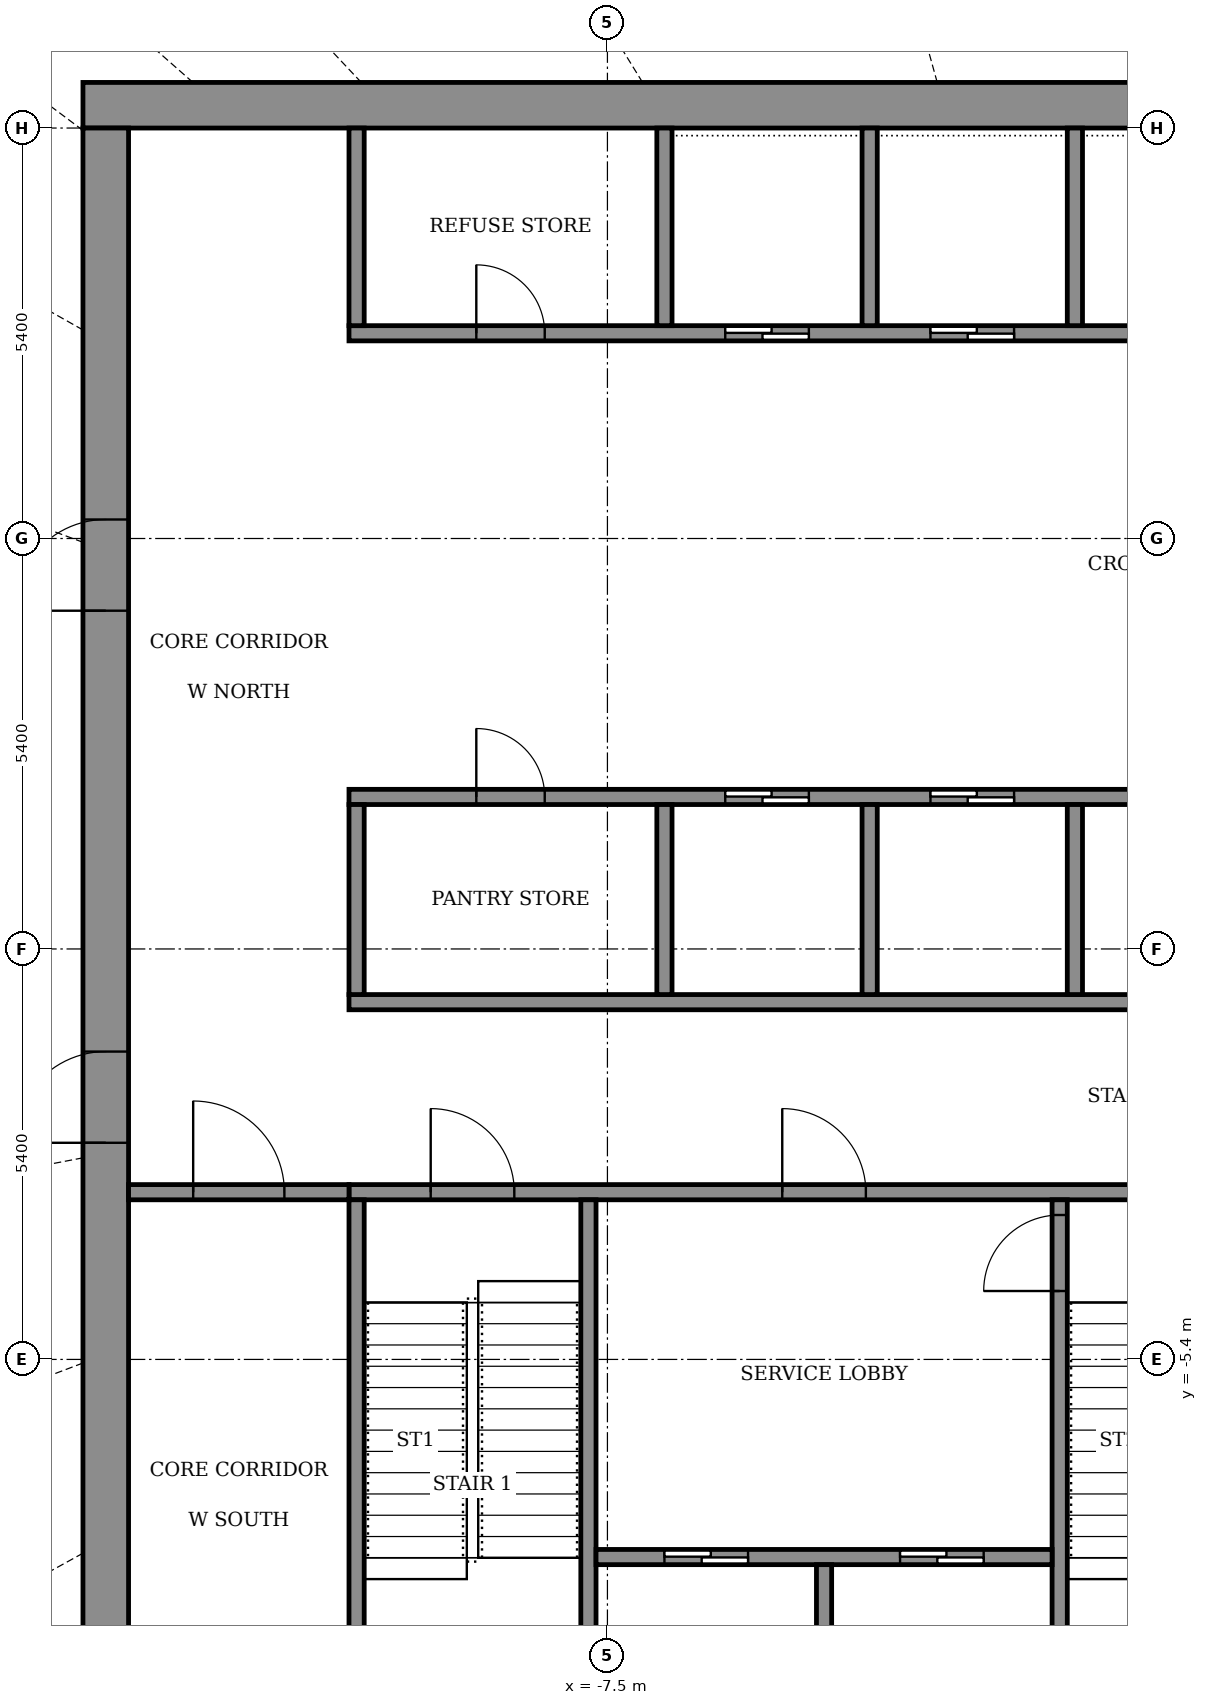
"""IFC4 building model, lengths in metres.
Left out: names, types, materials, properties, quantities, classifications, styles, units other than length and angle.
Written with IfcOpenShell. Run it as: python <this file> out.ifc"""

import sys

from ifc_helpers import new_model, si_unit, direction, frame, frame_2d, origin, place, context, subcontext, project, spatial, rectangle, extrude, element, fill, save


model = new_model("IFC4")
c1 = context("Model", 3, precision=1e-05, world=origin(), true_north=direction((0.0, 1.0)))
c2 = subcontext(c1, "Body", "Model", "MODEL_VIEW")
j1 = project(units=[si_unit("LENGTHUNIT", "METRE"), si_unit("PLANEANGLEUNIT", "RADIAN")], contexts=[c1])
p1 = place(None, origin())
s1 = spatial("IfcSite", under=j1, at=p1, CompositionType="ELEMENT")
p2 = place(p1, origin())
s2 = spatial("IfcBuilding", under=s1, at=p2, CompositionType="ELEMENT")
p3 = place(p2, frame((0.0, 0.0, 337.9)))
s3 = spatial("IfcBuildingStorey", under=s2, at=p3, CompositionType="ELEMENT", Elevation=337.9)
p4 = place(p3, frame((-14.4, 11.1, 0.0), z_axis=(0.0, 0.0, 1.0), x_axis=(1.0, 0.0, 0.0)))
e1 = element("IfcWall", 1, at=p4, inside=s3, PredefinedType="SHEAR", context=c2, shape_type="SweptSolid", body=[
    extrude(rectangle(XDim=28.8, YDim=0.6, at=frame_2d((14.4, 0.0))), origin(), (0.0, 0.0, 1.0), 4.6),
])
p5 = place(p3, frame((-14.1, -10.8, 0.0), z_axis=(0.0, 0.0, 1.0), x_axis=(0.0, 1.0, 0.0)))
e2 = element("IfcWall", 2, at=p5, inside=s3, PredefinedType="SHEAR", context=c2, shape_type="SweptSolid", body=[
    extrude(rectangle(XDim=21.6, YDim=0.6, at=frame_2d((10.8, 0.0))), origin(), (0.0, 0.0, 1.0), 4.6),
])
p6 = place(p5, frame((8.25, 0.0, 0.0)))
e3 = element("IfcOpeningElement", 3, at=p6, cuts=e2, PredefinedType="OPENING", context=c2, shape_type="SweptSolid", body=[
    extrude(rectangle(XDim=1.2, YDim=2.1, at=frame_2d((0.6, 1.05))), frame((0.0, 0.31, 0.0), z_axis=(0.0, -1.0, 0.0), x_axis=(1.0, 0.0, 0.0)), (0.0, 0.0, 1.0), 0.62),
])
p7 = place(p5, frame((15.25, 0.0, 0.0)))
e4 = element("IfcOpeningElement", 4, at=p7, cuts=e2, PredefinedType="OPENING", context=c2, shape_type="SweptSolid", body=[
    extrude(rectangle(XDim=1.2, YDim=2.1, at=frame_2d((0.6, 1.05))), frame((0.0, 0.31, 0.0), z_axis=(0.0, -1.0, 0.0), x_axis=(1.0, 0.0, 0.0)), (0.0, 0.0, 1.0), 0.62),
])
p8 = place(p3, frame((-10.9, -3.2, 0.0), z_axis=(0.0, 0.0, 1.0), x_axis=(1.0, 0.0, 0.0)))
e5 = element("IfcWall", 5, at=p8, inside=s3, PredefinedType="SHEAR", context=c2, shape_type="SweptSolid", body=[
    extrude(rectangle(XDim=21.8, YDim=0.2, at=frame_2d((10.9, 0.0))), origin(), (0.0, 0.0, 1.0), 4.05),
])
p9 = place(p8, frame((1.075, 0.0, 0.0)))
e6 = element("IfcOpeningElement", 6, at=p9, cuts=e5, PredefinedType="OPENING", context=c2, shape_type="SweptSolid", body=[
    extrude(rectangle(XDim=1.1, YDim=2.1, at=frame_2d((0.55, 1.05))), frame((0.0, 0.11, 0.0), z_axis=(0.0, -1.0, 0.0), x_axis=(1.0, 0.0, 0.0)), (0.0, 0.0, 1.0), 0.22),
])
p10 = place(p8, frame((10.325, 0.0, 0.0)))
e7 = element("IfcOpeningElement", 7, at=p10, cuts=e5, PredefinedType="OPENING", context=c2, shape_type="SweptSolid", body=[
    extrude(rectangle(XDim=1.1, YDim=2.1, at=frame_2d((0.55, 1.05))), frame((0.0, 0.11, 0.0), z_axis=(0.0, -1.0, 0.0), x_axis=(1.0, 0.0, 0.0)), (0.0, 0.0, 1.0), 0.22),
])
p11 = place(p8, frame((19.625, 0.0, 0.0)))
e8 = element("IfcOpeningElement", 8, at=p11, cuts=e5, PredefinedType="OPENING", context=c2, shape_type="SweptSolid", body=[
    extrude(rectangle(XDim=1.1, YDim=2.1, at=frame_2d((0.55, 1.05))), frame((0.0, 0.11, 0.0), z_axis=(0.0, -1.0, 0.0), x_axis=(1.0, 0.0, 0.0)), (0.0, 0.0, 1.0), 0.22),
])
p12 = place(p8, frame((5.7, 0.0, 0.0)))
e9 = element("IfcOpeningElement", 9, at=p12, cuts=e5, PredefinedType="OPENING", context=c2, shape_type="SweptSolid", body=[
    extrude(rectangle(XDim=1.1, YDim=2.1, at=frame_2d((0.55, 1.05))), frame((0.0, 0.11, 0.0), z_axis=(0.0, -1.0, 0.0), x_axis=(1.0, 0.0, 0.0)), (0.0, 0.0, 1.0), 0.22),
])
p13 = place(p8, frame((14.975, 0.0, 0.0)))
e10 = element("IfcOpeningElement", 10, at=p13, cuts=e5, PredefinedType="OPENING", context=c2, shape_type="SweptSolid", body=[
    extrude(rectangle(XDim=1.1, YDim=2.1, at=frame_2d((0.55, 1.05))), frame((0.0, 0.11, 0.0), z_axis=(0.0, -1.0, 0.0), x_axis=(1.0, 0.0, 0.0)), (0.0, 0.0, 1.0), 0.22),
])
p14 = place(p3, frame((-10.9, -0.7, 0.0), z_axis=(0.0, 0.0, 1.0), x_axis=(1.0, 0.0, 0.0)))
e11 = element("IfcWall", 11, at=p14, inside=s3, PredefinedType="SHEAR", context=c2, shape_type="SweptSolid", body=[
    extrude(rectangle(XDim=21.8, YDim=0.2, at=frame_2d((10.9, 0.0))), origin(), (0.0, 0.0, 1.0), 4.05),
])
p15 = place(p3, frame((-10.9, 2.0, 0.0), z_axis=(0.0, 0.0, 1.0), x_axis=(1.0, 0.0, 0.0)))
e12 = element("IfcWall", 12, at=p15, inside=s3, PredefinedType="SHEAR", context=c2, shape_type="SweptSolid", body=[
    extrude(rectangle(XDim=21.8, YDim=0.2, at=frame_2d((10.9, 0.0))), origin(), (0.0, 0.0, 1.0), 4.05),
])
p16 = place(p15, frame((4.95, 0.0, 0.0)))
e13 = element("IfcOpeningElement", 13, at=p16, cuts=e12, PredefinedType="OPENING", context=c2, shape_type="SweptSolid", body=[
    extrude(rectangle(XDim=1.1, YDim=2.1, at=frame_2d((0.55, 1.05))), frame((0.0, 0.11, 0.0), z_axis=(0.0, -1.0, 0.0), x_axis=(1.0, 0.0, 0.0)), (0.0, 0.0, 1.0), 0.22),
])
p17 = place(p15, frame((7.65, 0.0, 0.0)))
e14 = element("IfcOpeningElement", 14, at=p17, cuts=e12, PredefinedType="OPENING", context=c2, shape_type="SweptSolid", body=[
    extrude(rectangle(XDim=1.1, YDim=2.1, at=frame_2d((0.55, 1.05))), frame((0.0, 0.11, 0.0), z_axis=(0.0, -1.0, 0.0), x_axis=(1.0, 0.0, 0.0)), (0.0, 0.0, 1.0), 0.22),
])
p18 = place(p15, frame((10.35, 0.0, 0.0)))
e15 = element("IfcOpeningElement", 15, at=p18, cuts=e12, PredefinedType="OPENING", context=c2, shape_type="SweptSolid", body=[
    extrude(rectangle(XDim=1.1, YDim=2.1, at=frame_2d((0.55, 1.05))), frame((0.0, 0.11, 0.0), z_axis=(0.0, -1.0, 0.0), x_axis=(1.0, 0.0, 0.0)), (0.0, 0.0, 1.0), 0.22),
])
p19 = place(p15, frame((1.675, 0.0, 0.0)))
e16 = element("IfcOpeningElement", 16, at=p19, cuts=e12, PredefinedType="OPENING", context=c2, shape_type="SweptSolid", body=[
    extrude(rectangle(XDim=0.9, YDim=2.1, at=frame_2d((0.45, 1.05))), frame((0.0, 0.11, 0.0), z_axis=(0.0, -1.0, 0.0), x_axis=(1.0, 0.0, 0.0)), (0.0, 0.0, 1.0), 0.22),
])
p20 = place(p15, frame((16.525, 0.0, 0.0)))
e17 = element("IfcOpeningElement", 17, at=p20, cuts=e12, PredefinedType="OPENING", context=c2, shape_type="SweptSolid", body=[
    extrude(rectangle(XDim=0.9, YDim=2.1, at=frame_2d((0.45, 1.05))), frame((0.0, 0.11, 0.0), z_axis=(0.0, -1.0, 0.0), x_axis=(1.0, 0.0, 0.0)), (0.0, 0.0, 1.0), 0.22),
])
p21 = place(p3, frame((-10.9, 8.1, 0.0), z_axis=(0.0, 0.0, 1.0), x_axis=(1.0, 0.0, 0.0)))
e18 = element("IfcWall", 18, at=p21, inside=s3, PredefinedType="SHEAR", context=c2, shape_type="SweptSolid", body=[
    extrude(rectangle(XDim=21.8, YDim=0.2, at=frame_2d((10.9, 0.0))), origin(), (0.0, 0.0, 1.0), 4.05),
])
p22 = place(p21, frame((4.95, 0.0, 0.0)))
e19 = element("IfcOpeningElement", 19, at=p22, cuts=e18, PredefinedType="OPENING", context=c2, shape_type="SweptSolid", body=[
    extrude(rectangle(XDim=1.1, YDim=2.1, at=frame_2d((0.55, 1.05))), frame((0.0, 0.11, 0.0), z_axis=(0.0, -1.0, 0.0), x_axis=(1.0, 0.0, 0.0)), (0.0, 0.0, 1.0), 0.22),
])
p23 = place(p21, frame((7.65, 0.0, 0.0)))
e20 = element("IfcOpeningElement", 20, at=p23, cuts=e18, PredefinedType="OPENING", context=c2, shape_type="SweptSolid", body=[
    extrude(rectangle(XDim=1.1, YDim=2.1, at=frame_2d((0.55, 1.05))), frame((0.0, 0.11, 0.0), z_axis=(0.0, -1.0, 0.0), x_axis=(1.0, 0.0, 0.0)), (0.0, 0.0, 1.0), 0.22),
])
p24 = place(p21, frame((10.35, 0.0, 0.0)))
e21 = element("IfcOpeningElement", 21, at=p24, cuts=e18, PredefinedType="OPENING", context=c2, shape_type="SweptSolid", body=[
    extrude(rectangle(XDim=1.1, YDim=2.1, at=frame_2d((0.55, 1.05))), frame((0.0, 0.11, 0.0), z_axis=(0.0, -1.0, 0.0), x_axis=(1.0, 0.0, 0.0)), (0.0, 0.0, 1.0), 0.22),
])
p25 = place(p21, frame((1.675, 0.0, 0.0)))
e22 = element("IfcOpeningElement", 22, at=p25, cuts=e18, PredefinedType="OPENING", context=c2, shape_type="SweptSolid", body=[
    extrude(rectangle(XDim=0.9, YDim=2.1, at=frame_2d((0.45, 1.05))), frame((0.0, 0.11, 0.0), z_axis=(0.0, -1.0, 0.0), x_axis=(1.0, 0.0, 0.0)), (0.0, 0.0, 1.0), 0.22),
])
p26 = place(p21, frame((16.525, 0.0, 0.0)))
e23 = element("IfcOpeningElement", 23, at=p26, cuts=e18, PredefinedType="OPENING", context=c2, shape_type="SweptSolid", body=[
    extrude(rectangle(XDim=0.9, YDim=2.1, at=frame_2d((0.45, 1.05))), frame((0.0, 0.11, 0.0), z_axis=(0.0, -1.0, 0.0), x_axis=(1.0, 0.0, 0.0)), (0.0, 0.0, 1.0), 0.22),
])
for number, where, z_axis, x_axis in (
    (24, (-10.8, -10.8, 0.0), (0.0, 0.0, 1.0), (0.0, 1.0, 0.0)),
    (25, (-7.75, -10.8, 0.0), (0.0, 0.0, 1.0), (0.0, 1.0, 0.0)),
):
    element("IfcWall", number, at=place(p3, frame(where, z_axis=z_axis, x_axis=x_axis)), inside=s3, PredefinedType="SHEAR", context=c2, shape_type="SweptSolid", body=[
        extrude(rectangle(XDim=7.5, YDim=0.2, at=frame_2d((3.75, 0.0))), origin(), (0.0, 0.0, 1.0), 4.05),
    ])
p27 = place(p3, frame((-1.55, -10.8, 0.0), z_axis=(0.0, 0.0, 1.0), x_axis=(0.0, 1.0, 0.0)))
e26 = element("IfcWall", 26, at=p27, inside=s3, PredefinedType="SHEAR", context=c2, shape_type="SweptSolid", body=[
    extrude(rectangle(XDim=7.5, YDim=0.2, at=frame_2d((3.75, 0.0))), origin(), (0.0, 0.0, 1.0), 4.05),
])
p28 = place(p27, frame((6.3, 0.0, 0.0)))
e27 = element("IfcOpeningElement", 27, at=p28, cuts=e26, PredefinedType="OPENING", context=c2, shape_type="SweptSolid", body=[
    extrude(rectangle(XDim=1.0, YDim=2.1, at=frame_2d((0.5, 1.05))), frame((0.0, 0.11, 0.0), z_axis=(0.0, -1.0, 0.0), x_axis=(1.0, 0.0, 0.0)), (0.0, 0.0, 1.0), 0.22),
])
p29 = place(p3, frame((-7.65, -8.0, 0.0), z_axis=(0.0, 0.0, 1.0), x_axis=(1.0, 0.0, 0.0)))
e28 = element("IfcWall", 28, at=p29, inside=s3, PredefinedType="SHEAR", context=c2, shape_type="SweptSolid", body=[
    extrude(rectangle(XDim=6.0, YDim=0.2, at=frame_2d((3.0, 0.0))), origin(), (0.0, 0.0, 1.0), 4.05),
])
p30 = place(p29, frame((0.9, 0.0, 0.0)))
e29 = element("IfcOpeningElement", 29, at=p30, cuts=e28, PredefinedType="OPENING", context=c2, shape_type="SweptSolid", body=[
    extrude(rectangle(XDim=1.1, YDim=2.1, at=frame_2d((0.55, 1.05))), frame((0.0, 0.11, 0.0), z_axis=(0.0, -1.0, 0.0), x_axis=(1.0, 0.0, 0.0)), (0.0, 0.0, 1.0), 0.22),
])
p31 = place(p29, frame((4.0, 0.0, 0.0)))
e30 = element("IfcOpeningElement", 30, at=p31, cuts=e28, PredefinedType="OPENING", context=c2, shape_type="SweptSolid", body=[
    extrude(rectangle(XDim=1.1, YDim=2.1, at=frame_2d((0.55, 1.05))), frame((0.0, 0.11, 0.0), z_axis=(0.0, -1.0, 0.0), x_axis=(1.0, 0.0, 0.0)), (0.0, 0.0, 1.0), 0.22),
])
p32 = place(p3, frame((-4.65, -10.8, 0.0), z_axis=(0.0, 0.0, 1.0), x_axis=(0.0, 1.0, 0.0)))
e31 = element("IfcWall", 31, at=p32, inside=s3, PredefinedType="SHEAR", context=c2, shape_type="SweptSolid", body=[
    extrude(rectangle(XDim=2.7, YDim=0.2, at=frame_2d((1.35, 0.0))), origin(), (0.0, 0.0, 1.0), 4.05),
])
p33 = place(p3, frame((-10.8, -0.6, 0.0), z_axis=(0.0, 0.0, 1.0), x_axis=(0.0, 1.0, 0.0)))
e32 = element("IfcWall", 32, at=p33, inside=s3, PredefinedType="STANDARD", context=c2, shape_type="SweptSolid", body=[
    extrude(rectangle(XDim=2.5, YDim=0.2, at=frame_2d((1.25, 0.0))), origin(), (0.0, 0.0, 1.0), 4.05),
])
for number, where, z_axis, x_axis in (
    (33, (-6.75, -0.6, 0.0), (0.0, 0.0, 1.0), (0.0, 1.0, 0.0)),
    (34, (-4.05, -0.6, 0.0), (0.0, 0.0, 1.0), (0.0, 1.0, 0.0)),
    (35, (-1.35, -0.6, 0.0), (0.0, 0.0, 1.0), (0.0, 1.0, 0.0)),
):
    element("IfcWall", number, at=place(p3, frame(where, z_axis=z_axis, x_axis=x_axis)), inside=s3, PredefinedType="SHEAR", context=c2, shape_type="SweptSolid", body=[
        extrude(rectangle(XDim=2.5, YDim=0.2, at=frame_2d((1.25, 0.0))), origin(), (0.0, 0.0, 1.0), 4.05),
    ])
p34 = place(p3, frame((-10.8, 8.2, 0.0), z_axis=(0.0, 0.0, 1.0), x_axis=(0.0, 1.0, 0.0)))
e36 = element("IfcWall", 36, at=p34, inside=s3, PredefinedType="STANDARD", context=c2, shape_type="SweptSolid", body=[
    extrude(rectangle(XDim=2.6, YDim=0.2, at=frame_2d((1.3, 0.0))), origin(), (0.0, 0.0, 1.0), 4.05),
])
for number, where, z_axis, x_axis in (
    (37, (-6.75, 8.2, 0.0), (0.0, 0.0, 1.0), (0.0, 1.0, 0.0)),
    (38, (-4.05, 8.2, 0.0), (0.0, 0.0, 1.0), (0.0, 1.0, 0.0)),
    (39, (-1.35, 8.2, 0.0), (0.0, 0.0, 1.0), (0.0, 1.0, 0.0)),
):
    element("IfcWall", number, at=place(p3, frame(where, z_axis=z_axis, x_axis=x_axis)), inside=s3, PredefinedType="SHEAR", context=c2, shape_type="SweptSolid", body=[
        extrude(rectangle(XDim=2.6, YDim=0.2, at=frame_2d((1.3, 0.0))), origin(), (0.0, 0.0, 1.0), 4.05),
    ])
p35 = place(p3, frame((-13.8, -3.2, 0.0), z_axis=(0.0, 0.0, 1.0), x_axis=(1.0, 0.0, 0.0)))
e40 = element("IfcWall", 40, at=p35, inside=s3, PredefinedType="STANDARD", context=c2, shape_type="SweptSolid", body=[
    extrude(rectangle(XDim=2.9, YDim=0.2, at=frame_2d((1.45, 0.0))), origin(), (0.0, 0.0, 1.0), 4.05),
])
p36 = place(p35, frame((0.85, 0.0, 0.0)))
e41 = element("IfcOpeningElement", 41, at=p36, cuts=e40, PredefinedType="OPENING", context=c2, shape_type="SweptSolid", body=[
    extrude(rectangle(XDim=1.2, YDim=2.1, at=frame_2d((0.6, 1.05))), frame((0.0, 0.11, 0.0), z_axis=(0.0, -1.0, 0.0), x_axis=(1.0, 0.0, 0.0)), (0.0, 0.0, 1.0), 0.22),
])
p37 = place(p6, origin())
e42 = element("IfcDoor", 42, at=p37, inside=s3, OperationType="DOUBLE_DOOR_SINGLE_SWING", PredefinedType="DOOR", context=c2, shape_type="SweptSolid", body=[
    extrude(rectangle(XDim=1.2, YDim=2.1, at=frame_2d((0.6, 1.05))), frame((0.0, 0.025, 0.0), z_axis=(0.0, -1.0, 0.0), x_axis=(1.0, 0.0, 0.0)), (0.0, 0.0, 1.0), 0.05),
])
fill(e3, e42)
p38 = place(p7, origin())
e43 = element("IfcDoor", 43, at=p38, inside=s3, OperationType="DOUBLE_DOOR_SINGLE_SWING", PredefinedType="DOOR", context=c2, shape_type="SweptSolid", body=[
    extrude(rectangle(XDim=1.2, YDim=2.1, at=frame_2d((0.6, 1.05))), frame((0.0, 0.025, 0.0), z_axis=(0.0, -1.0, 0.0), x_axis=(1.0, 0.0, 0.0)), (0.0, 0.0, 1.0), 0.05),
])
fill(e4, e43)
p39 = place(p16, origin())
e44 = element("IfcDoor", 44, at=p39, inside=s3, OperationType="SLIDING_TO_LEFT", PredefinedType="DOOR", context=c2, shape_type="SweptSolid", body=[
    extrude(rectangle(XDim=1.1, YDim=2.1, at=frame_2d((0.55, 1.05))), frame((0.0, 0.025, 0.0), z_axis=(0.0, -1.0, 0.0), x_axis=(1.0, 0.0, 0.0)), (0.0, 0.0, 1.0), 0.05),
])
fill(e13, e44)
p40 = place(p17, origin())
e45 = element("IfcDoor", 45, at=p40, inside=s3, OperationType="SLIDING_TO_LEFT", PredefinedType="DOOR", context=c2, shape_type="SweptSolid", body=[
    extrude(rectangle(XDim=1.1, YDim=2.1, at=frame_2d((0.55, 1.05))), frame((0.0, 0.025, 0.0), z_axis=(0.0, -1.0, 0.0), x_axis=(1.0, 0.0, 0.0)), (0.0, 0.0, 1.0), 0.05),
])
fill(e14, e45)
p41 = place(p22, origin())
e46 = element("IfcDoor", 46, at=p41, inside=s3, OperationType="SLIDING_TO_LEFT", PredefinedType="DOOR", context=c2, shape_type="SweptSolid", body=[
    extrude(rectangle(XDim=1.1, YDim=2.1, at=frame_2d((0.55, 1.05))), frame((0.0, 0.025, 0.0), z_axis=(0.0, -1.0, 0.0), x_axis=(1.0, 0.0, 0.0)), (0.0, 0.0, 1.0), 0.05),
])
fill(e19, e46)
p42 = place(p23, origin())
e47 = element("IfcDoor", 47, at=p42, inside=s3, OperationType="SLIDING_TO_LEFT", PredefinedType="DOOR", context=c2, shape_type="SweptSolid", body=[
    extrude(rectangle(XDim=1.1, YDim=2.1, at=frame_2d((0.55, 1.05))), frame((0.0, 0.025, 0.0), z_axis=(0.0, -1.0, 0.0), x_axis=(1.0, 0.0, 0.0)), (0.0, 0.0, 1.0), 0.05),
])
fill(e20, e47)
p43 = place(p19, origin())
e48 = element("IfcDoor", 48, at=p43, inside=s3, OperationType="SINGLE_SWING_RIGHT", PredefinedType="DOOR", context=c2, shape_type="SweptSolid", body=[
    extrude(rectangle(XDim=0.9, YDim=2.1, at=frame_2d((0.45, 1.05))), frame((0.0, 0.025, 0.0), z_axis=(0.0, -1.0, 0.0), x_axis=(1.0, 0.0, 0.0)), (0.0, 0.0, 1.0), 0.05),
])
fill(e16, e48)
p44 = place(p25, origin())
e49 = element("IfcDoor", 49, at=p44, inside=s3, OperationType="SINGLE_SWING_RIGHT", PredefinedType="DOOR", context=c2, shape_type="SweptSolid", body=[
    extrude(rectangle(XDim=0.9, YDim=2.1, at=frame_2d((0.45, 1.05))), frame((0.0, 0.025, 0.0), z_axis=(0.0, -1.0, 0.0), x_axis=(1.0, 0.0, 0.0)), (0.0, 0.0, 1.0), 0.05),
])
fill(e22, e49)
p45 = place(p30, origin())
e50 = element("IfcDoor", 50, at=p45, inside=s3, OperationType="SLIDING_TO_LEFT", PredefinedType="DOOR", context=c2, shape_type="SweptSolid", body=[
    extrude(rectangle(XDim=1.1, YDim=2.1, at=frame_2d((0.55, 1.05))), frame((0.0, 0.025, 0.0), z_axis=(0.0, -1.0, 0.0), x_axis=(1.0, 0.0, 0.0)), (0.0, 0.0, 1.0), 0.05),
])
fill(e29, e50)
p46 = place(p31, origin())
e51 = element("IfcDoor", 51, at=p46, inside=s3, OperationType="SLIDING_TO_LEFT", PredefinedType="DOOR", context=c2, shape_type="SweptSolid", body=[
    extrude(rectangle(XDim=1.1, YDim=2.1, at=frame_2d((0.55, 1.05))), frame((0.0, 0.025, 0.0), z_axis=(0.0, -1.0, 0.0), x_axis=(1.0, 0.0, 0.0)), (0.0, 0.0, 1.0), 0.05),
])
fill(e30, e51)
p47 = place(p9, origin())
e52 = element("IfcDoor", 52, at=p47, inside=s3, OperationType="SINGLE_SWING_RIGHT", PredefinedType="DOOR", context=c2, shape_type="SweptSolid", body=[
    extrude(rectangle(XDim=1.1, YDim=2.1, at=frame_2d((0.55, 1.05))), frame((0.0, 0.025, 0.0), z_axis=(0.0, -1.0, 0.0), x_axis=(1.0, 0.0, 0.0)), (0.0, 0.0, 1.0), 0.05),
])
fill(e6, e52)
p48 = place(p12, origin())
e53 = element("IfcDoor", 53, at=p48, inside=s3, OperationType="SINGLE_SWING_LEFT", PredefinedType="DOOR", context=c2, shape_type="SweptSolid", body=[
    extrude(rectangle(XDim=1.1, YDim=2.1, at=frame_2d((0.55, 1.05))), frame((0.0, 0.025, 0.0), z_axis=(0.0, -1.0, 0.0), x_axis=(1.0, 0.0, 0.0)), (0.0, 0.0, 1.0), 0.05),
])
fill(e9, e53)
p49 = place(p28, origin())
e54 = element("IfcDoor", 54, at=p49, inside=s3, OperationType="SINGLE_SWING_RIGHT", PredefinedType="DOOR", context=c2, shape_type="SweptSolid", body=[
    extrude(rectangle(XDim=1.0, YDim=2.1, at=frame_2d((0.5, 1.05))), frame((0.0, 0.025, 0.0), z_axis=(0.0, -1.0, 0.0), x_axis=(1.0, 0.0, 0.0)), (0.0, 0.0, 1.0), 0.05),
])
fill(e27, e54)
p50 = place(p36, origin())
e55 = element("IfcDoor", 55, at=p50, inside=s3, OperationType="SINGLE_SWING_LEFT", PredefinedType="DOOR", context=c2, shape_type="SweptSolid", body=[
    extrude(rectangle(XDim=1.2, YDim=2.1, at=frame_2d((0.6, 1.05))), frame((0.0, 0.025, 0.0), z_axis=(0.0, -1.0, 0.0), x_axis=(1.0, 0.0, 0.0)), (0.0, 0.0, 1.0), 0.05),
])
fill(e41, e55)
save(model, sys.argv[1])
